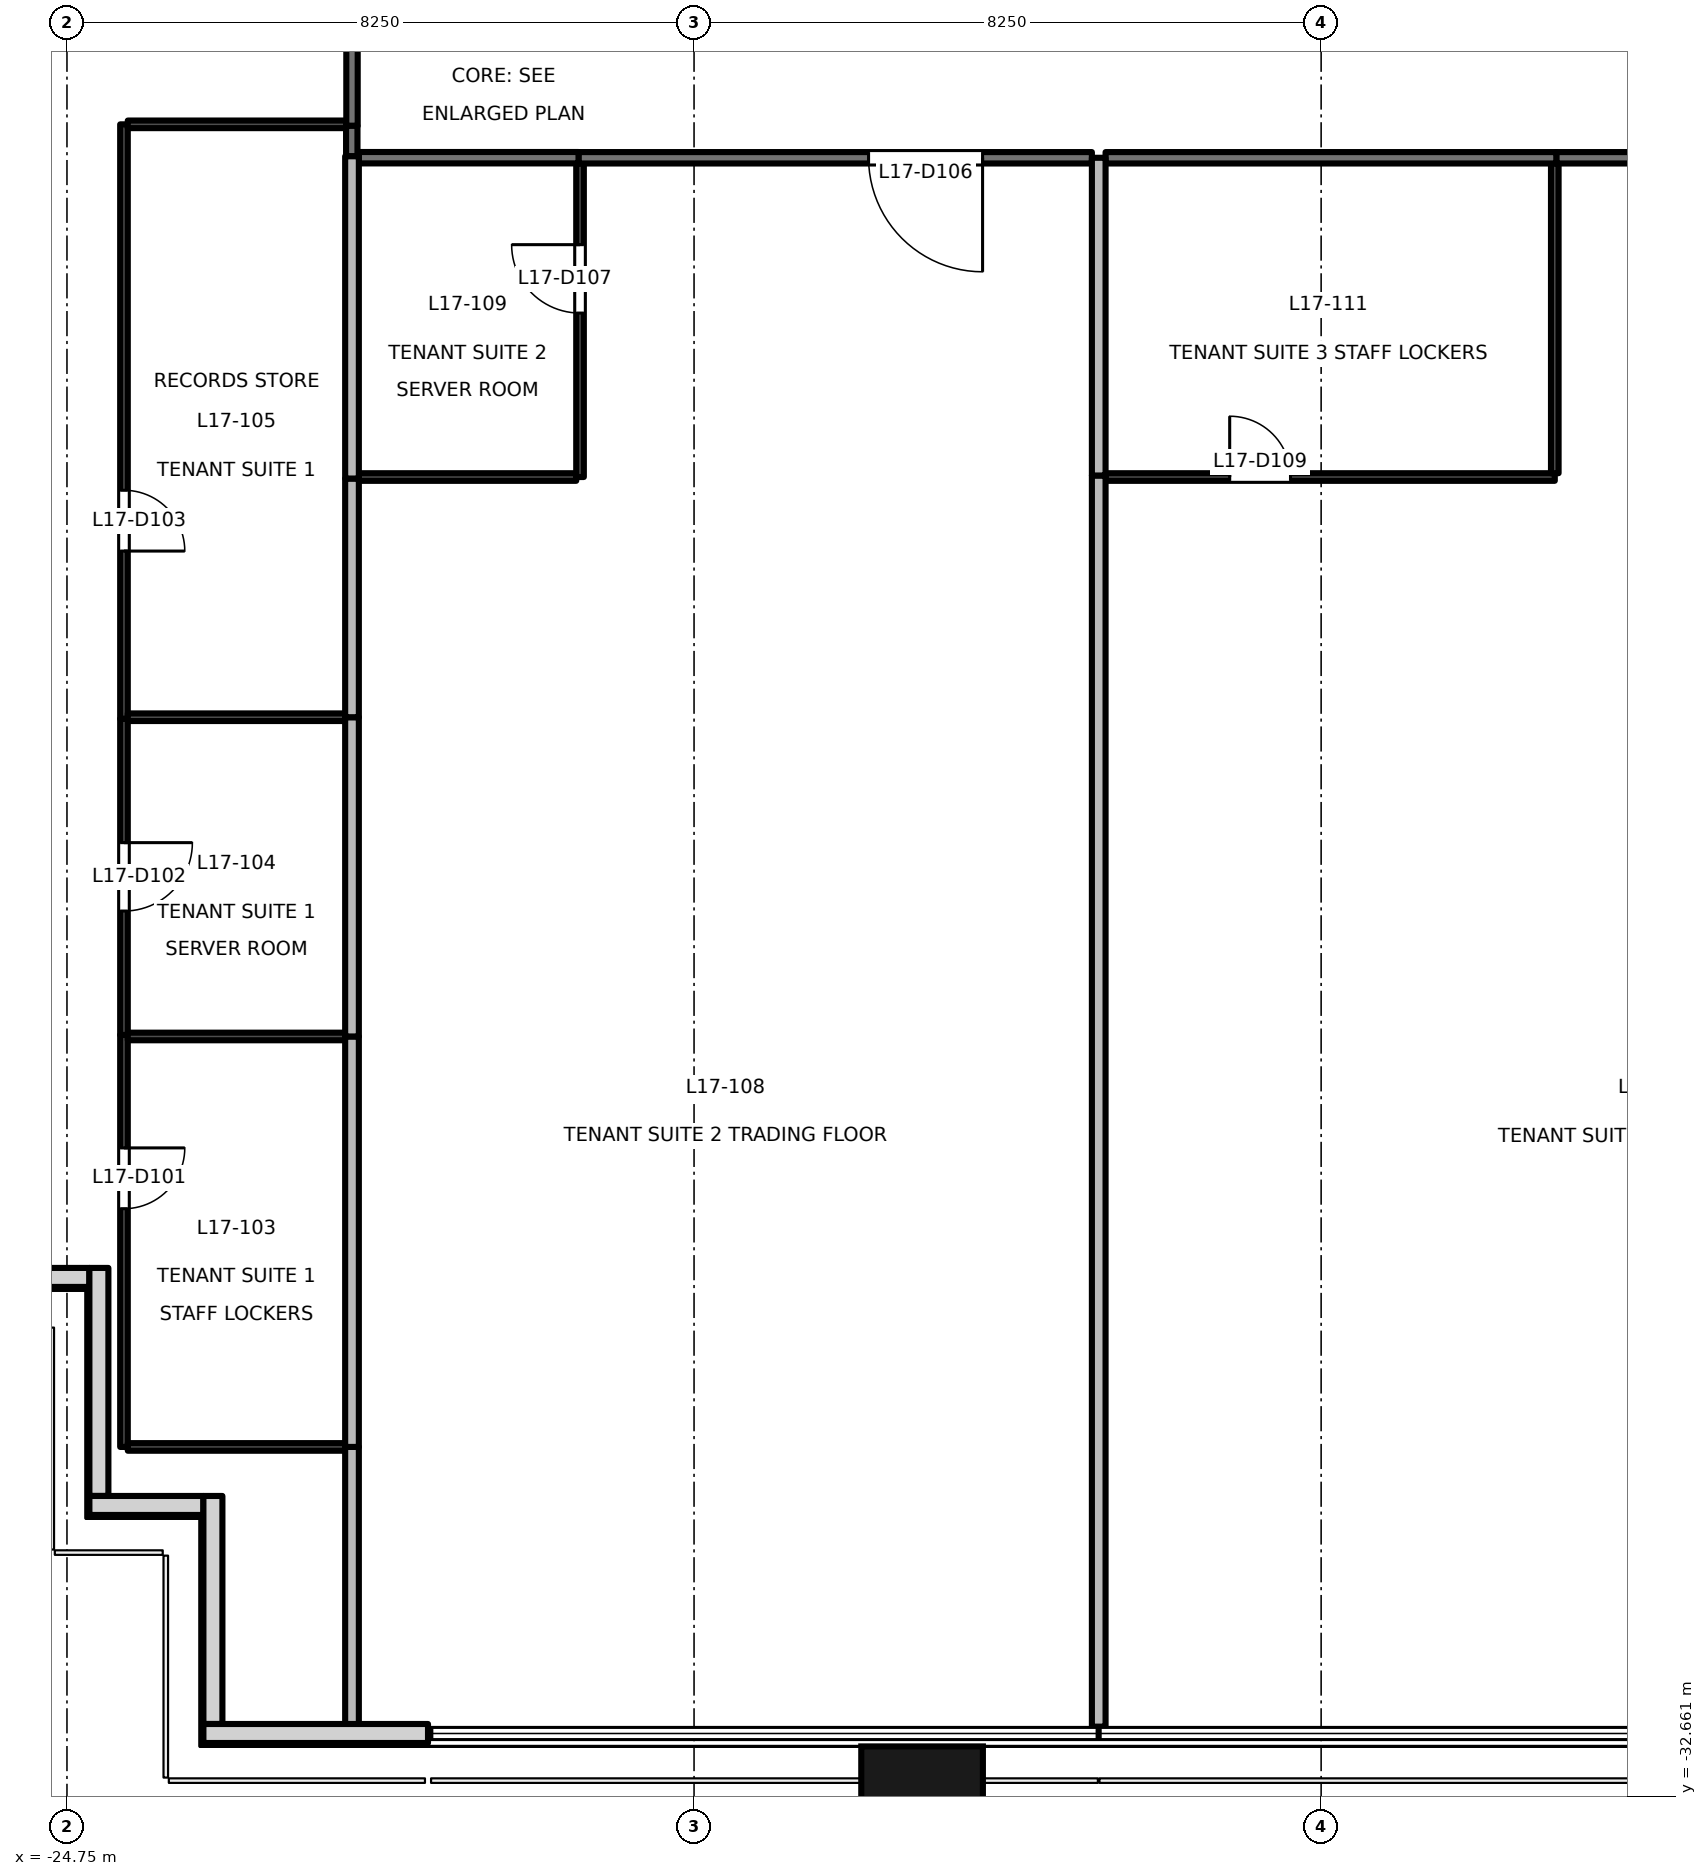
"""IFC4 building model, lengths in metres.
Left out: names, types, materials, properties, quantities, classifications, styles, units other than length and angle.
Written with IfcOpenShell. Run it as: python <this file> out.ifc"""

import sys

from ifc_helpers import new_model, si_unit, direction, frame, frame_2d, origin, origin_2d, place, context, subcontext, project, spatial, rectangle, extrude, element, fill, save


model = new_model("IFC4")
c1 = context("Model", 3, precision=1e-05, world=origin(), true_north=direction((0.0, 1.0)))
c2 = subcontext(c1, "Body", "Model", "MODEL_VIEW")
j1 = project(units=[si_unit("LENGTHUNIT", "METRE"), si_unit("PLANEANGLEUNIT", "RADIAN")], contexts=[c1])
p1 = place(None, origin())
s1 = spatial("IfcSite", under=j1, at=p1, CompositionType="ELEMENT")
p2 = place(p1, origin())
s2 = spatial("IfcBuilding", under=s1, at=p2, CompositionType="ELEMENT")
p3 = place(p2, frame((0.0, 0.0, 79.7)))
s3 = spatial("IfcBuildingStorey", under=s2, at=p3, CompositionType="ELEMENT", Elevation=79.7)
p4 = place(p3, frame((-13.5, -32.9, -0.2), z_axis=(0.0, 0.0, 1.0), x_axis=(1.0, 0.0, 0.0)))
e1 = element("IfcColumn", 1, at=p4, inside=s3, PredefinedType="COLUMN", context=c2, shape_type="SweptSolid", body=[
    extrude(rectangle(XDim=1.6, YDim=1.8, at=origin_2d()), origin(), (0.0, 0.0, 1.0), 4.0),
])
p5 = place(p3, frame((-25.91, -25.83, 0.0), z_axis=(0.0, 0.0, 1.0), x_axis=(1.0, 0.0, 0.0)))
e2 = element("IfcWall", 2, at=p5, inside=s3, PredefinedType="SOLIDWALL", context=c2, shape_type="SweptSolid", body=[
    extrude(rectangle(XDim=1.455, YDim=0.25, at=frame_2d((0.728, 0.0))), origin(), (0.0, 0.0, 1.0), 3.8),
])
p6 = place(p3, frame((-24.33, -25.705, 0.0), z_axis=(0.0, 0.0, 1.0), x_axis=(0.0, -1.0, 0.0)))
e3 = element("IfcWall", 3, at=p6, inside=s3, PredefinedType="SOLIDWALL", context=c2, shape_type="SweptSolid", body=[
    extrude(rectangle(XDim=3.0, YDim=0.25, at=frame_2d((1.5, 0.0))), origin(), (0.0, 0.0, 1.0), 3.8),
])
p7 = place(p3, frame((-24.455, -28.83, 0.0), z_axis=(0.0, 0.0, 1.0), x_axis=(1.0, 0.0, 0.0)))
e4 = element("IfcWall", 4, at=p7, inside=s3, PredefinedType="SOLIDWALL", context=c2, shape_type="SweptSolid", body=[
    extrude(rectangle(XDim=1.5, YDim=0.25, at=frame_2d((0.75, 0.0))), origin(), (0.0, 0.0, 1.0), 3.8),
])
p8 = place(p3, frame((-22.83, -28.705, 0.0), z_axis=(0.0, 0.0, 1.0), x_axis=(0.0, -1.0, 0.0)))
e5 = element("IfcWall", 5, at=p8, inside=s3, PredefinedType="SOLIDWALL", context=c2, shape_type="SweptSolid", body=[
    extrude(rectangle(XDim=3.0, YDim=0.25, at=frame_2d((1.5, 0.0))), origin(), (0.0, 0.0, 1.0), 3.8),
])
p9 = place(p3, frame((-22.955, -31.83, 0.0), z_axis=(0.0, 0.0, 1.0), x_axis=(1.0, 0.0, 0.0)))
e6 = element("IfcWall", 6, at=p9, inside=s3, PredefinedType="SOLIDWALL", context=c2, shape_type="SweptSolid", body=[
    extrude(rectangle(XDim=2.955, YDim=0.25, at=frame_2d((1.478, 0.0))), origin(), (0.0, 0.0, 1.0), 3.8),
])
p10 = place(p3, frame((-21.0, -10.68, 0.0), z_axis=(0.0, 0.0, 1.0), x_axis=(0.0, 1.0, 0.0)))
e7 = element("IfcWall", 7, at=p10, inside=s3, PredefinedType="PARTITIONING", context=c2, shape_type="SweptSolid", body=[
    extrude(rectangle(XDim=6.0, YDim=0.15, at=frame_2d((3.0, 0.0))), origin(), (0.0, 0.0, 1.0), 3.8),
])
p11 = place(p10, frame((3.7, 0.0, 0.0)))
e8 = element("IfcOpeningElement", 8, at=p11, cuts=e7, PredefinedType="OPENING", context=c2, shape_type="SweptSolid", body=[
    extrude(rectangle(XDim=0.9, YDim=2.1, at=frame_2d((0.45, 1.05))), frame((0.0, 0.085, 0.0), z_axis=(0.0, -1.0, 0.0), x_axis=(1.0, 0.0, 0.0)), (0.0, 0.0, 1.0), 0.171),
])
p12 = place(p3, frame((-21.003, -11.08, 0.0), z_axis=(0.0, 0.0, 1.0), x_axis=(0.0, 1.0, 0.0)))
e9 = element("IfcWall", 9, at=p12, inside=s3, PredefinedType="PARTITIONING", context=c2, shape_type="SweptSolid", body=[
    extrude(rectangle(XDim=0.4, YDim=0.15, at=frame_2d((0.2, 0.0))), origin(), (0.0, 0.0, 1.0), 3.8),
])
p13 = place(p3, frame((-11.266, -11.1, 0.0), z_axis=(0.0, 0.0, 1.0), x_axis=(-1.0, 0.0, 0.0)))
e10 = element("IfcWall", 10, at=p13, inside=s3, PredefinedType="PARTITIONING", context=c2, shape_type="SweptSolid", body=[
    extrude(rectangle(XDim=6.754, YDim=0.15, at=frame_2d((3.377, 0.0))), origin(), (0.0, 0.0, 1.0), 2.8),
])
p14 = place(p13, frame((1.438, 0.0, 0.0)))
e11 = element("IfcOpeningElement", 11, at=p14, cuts=e10, PredefinedType="OPENING", context=c2, shape_type="SweptSolid", body=[
    extrude(rectangle(XDim=1.5, YDim=2.1, at=frame_2d((0.75, 1.05))), frame((0.0, 0.085, 0.0), z_axis=(0.0, -1.0, 0.0), x_axis=(1.0, 0.0, 0.0)), (0.0, 0.0, 1.0), 0.171),
])
p15 = place(p3, frame((-18.02, -11.099, 0.0), z_axis=(0.0, 0.0, 1.0), x_axis=(-1.0, 0.0, 0.0)))
e12 = element("IfcWall", 12, at=p15, inside=s3, PredefinedType="PARTITIONING", context=c2, shape_type="SweptSolid", body=[
    extrude(rectangle(XDim=2.89, YDim=0.15, at=frame_2d((1.445, 0.0))), origin(), (0.0, 0.0, 1.0), 3.8),
])
p16 = place(p3, frame((-0.656, -11.1, 0.0), z_axis=(0.0, 0.0, 1.0), x_axis=(-1.0, 0.0, 0.0)))
e13 = element("IfcWall", 13, at=p16, inside=s3, PredefinedType="PARTITIONING", context=c2, shape_type="SweptSolid", body=[
    extrude(rectangle(XDim=4.5, YDim=0.15, at=frame_2d((2.25, 0.0))), origin(), (0.0, 0.0, 1.0), 2.8),
])
p17 = place(p16, frame((1.35, 0.0, 0.0)))
e14 = element("IfcOpeningElement", 14, at=p17, cuts=e13, PredefinedType="OPENING", context=c2, shape_type="SweptSolid", body=[
    extrude(rectangle(XDim=1.8, YDim=2.1, at=frame_2d((0.9, 1.05))), frame((0.0, 0.085, 0.0), z_axis=(0.0, -1.0, 0.0), x_axis=(1.0, 0.0, 0.0)), (0.0, 0.0, 1.0), 0.171),
])
p18 = place(p3, frame((-5.156, -11.1, 0.0), z_axis=(0.0, 0.0, 1.0), x_axis=(-1.0, 0.0, 0.0)))
e15 = element("IfcWall", 15, at=p18, inside=s3, PredefinedType="PARTITIONING", context=c2, shape_type="SweptSolid", body=[
    extrude(rectangle(XDim=5.93, YDim=0.15, at=frame_2d((2.965, 0.0))), origin(), (0.0, 0.0, 1.0), 2.8),
])
p19 = place(p3, frame((-24.0, -22.64, 0.0), z_axis=(0.0, 0.0, 1.0), x_axis=(0.0, -1.0, 0.0)))
e16 = element("IfcWall", 16, at=p19, inside=s3, PredefinedType="PARTITIONING", context=c2, shape_type="SweptSolid", body=[
    extrude(rectangle(XDim=5.42, YDim=0.1, at=frame_2d((2.71, 0.0))), origin(), (0.0, 0.0, 1.0), 3.8),
])
p20 = place(p19, frame((1.486, 0.0, 0.0)))
e17 = element("IfcOpeningElement", 17, at=p20, cuts=e16, PredefinedType="OPENING", context=c2, shape_type="SweptSolid", body=[
    extrude(rectangle(XDim=0.8, YDim=2.1, at=frame_2d((0.4, 1.05))), frame((0.0, 0.061, 0.0), z_axis=(0.0, -1.0, 0.0), x_axis=(1.0, 0.0, 0.0)), (0.0, 0.0, 1.0), 0.121),
])
p21 = place(p3, frame((-23.95, -28.06, 0.0), z_axis=(0.0, 0.0, 1.0), x_axis=(1.0, 0.0, 0.0)))
e18 = element("IfcWall", 18, at=p21, inside=s3, PredefinedType="PARTITIONING", context=c2, shape_type="SweptSolid", body=[
    extrude(rectangle(XDim=2.86, YDim=0.1, at=frame_2d((1.43, 0.0))), origin(), (0.0, 0.0, 1.0), 3.8),
])
p22 = place(p3, frame((-24.0, -18.48, 0.0), z_axis=(0.0, 0.0, 1.0), x_axis=(0.0, -1.0, 0.0)))
e19 = element("IfcWall", 19, at=p22, inside=s3, PredefinedType="PARTITIONING", context=c2, shape_type="SweptSolid", body=[
    extrude(rectangle(XDim=4.16, YDim=0.1, at=frame_2d((2.08, 0.0))), origin(), (0.0, 0.0, 1.0), 3.8),
])
p23 = place(p22, frame((1.63, 0.0, 0.0)))
e20 = element("IfcOpeningElement", 20, at=p23, cuts=e19, PredefinedType="OPENING", context=c2, shape_type="SweptSolid", body=[
    extrude(rectangle(XDim=0.9, YDim=2.1, at=frame_2d((0.45, 1.05))), frame((0.0, 0.061, 0.0), z_axis=(0.0, -1.0, 0.0), x_axis=(1.0, 0.0, 0.0)), (0.0, 0.0, 1.0), 0.121),
])
p24 = place(p3, frame((-24.0, -10.66, 0.0), z_axis=(0.0, 0.0, 1.0), x_axis=(0.0, -1.0, 0.0)))
e21 = element("IfcWall", 21, at=p24, inside=s3, PredefinedType="PARTITIONING", context=c2, shape_type="SweptSolid", body=[
    extrude(rectangle(XDim=7.82, YDim=0.1, at=frame_2d((3.91, 0.0))), origin(), (0.0, 0.0, 1.0), 3.8),
])
p25 = place(p24, frame((4.814, 0.0, 0.0)))
e22 = element("IfcOpeningElement", 22, at=p25, cuts=e21, PredefinedType="OPENING", context=c2, shape_type="SweptSolid", body=[
    extrude(rectangle(XDim=0.8, YDim=2.1, at=frame_2d((0.4, 1.05))), frame((0.0, 0.061, 0.0), z_axis=(0.0, -1.0, 0.0), x_axis=(1.0, 0.0, 0.0)), (0.0, 0.0, 1.0), 0.121),
])
p26 = place(p3, frame((-21.075, -10.66, 0.0), z_axis=(0.0, 0.0, 1.0), x_axis=(-1.0, 0.0, 0.0)))
e23 = element("IfcWall", 23, at=p26, inside=s3, PredefinedType="PARTITIONING", context=c2, shape_type="SweptSolid", body=[
    extrude(rectangle(XDim=2.875, YDim=0.1, at=frame_2d((1.438, 0.0))), origin(), (0.0, 0.0, 1.0), 3.8),
])
p27 = place(p3, frame((-21.0, -28.06, 0.0), z_axis=(0.0, 0.0, 1.0), x_axis=(0.0, -1.0, 0.0)))
e24 = element("IfcWall", 24, at=p27, inside=s3, PredefinedType="PARTITIONING", context=c2, shape_type="SweptSolid", body=[
    extrude(rectangle(XDim=3.68, YDim=0.18, at=frame_2d((1.84, 0.0))), origin(), (0.0, 0.0, 1.0), 3.8),
])
p28 = place(p3, frame((-23.95, -22.66, 0.0), z_axis=(0.0, 0.0, 1.0), x_axis=(1.0, 0.0, 0.0)))
e25 = element("IfcWall", 25, at=p28, inside=s3, PredefinedType="PARTITIONING", context=c2, shape_type="SweptSolid", body=[
    extrude(rectangle(XDim=2.86, YDim=0.1, at=frame_2d((1.43, 0.0))), origin(), (0.0, 0.0, 1.0), 3.8),
])
p29 = place(p3, frame((-21.0, -22.66, 0.0), z_axis=(0.0, 0.0, 1.0), x_axis=(0.0, -1.0, 0.0)))
e26 = element("IfcWall", 26, at=p29, inside=s3, PredefinedType="PARTITIONING", context=c2, shape_type="SweptSolid", body=[
    extrude(rectangle(XDim=5.4, YDim=0.18, at=frame_2d((2.7, 0.0))), origin(), (0.0, 0.0, 1.0), 3.8),
])
p30 = place(p3, frame((-23.95, -18.46, 0.0), z_axis=(0.0, 0.0, 1.0), x_axis=(1.0, 0.0, 0.0)))
e27 = element("IfcWall", 27, at=p30, inside=s3, PredefinedType="PARTITIONING", context=c2, shape_type="SweptSolid", body=[
    extrude(rectangle(XDim=2.86, YDim=0.1, at=frame_2d((1.43, 0.0))), origin(), (0.0, 0.0, 1.0), 3.8),
])
p31 = place(p3, frame((-21.0, -18.46, 0.0), z_axis=(0.0, 0.0, 1.0), x_axis=(0.0, -1.0, 0.0)))
e28 = element("IfcWall", 28, at=p31, inside=s3, PredefinedType="PARTITIONING", context=c2, shape_type="SweptSolid", body=[
    extrude(rectangle(XDim=4.2, YDim=0.18, at=frame_2d((2.1, 0.0))), origin(), (0.0, 0.0, 1.0), 3.8),
])
p32 = place(p3, frame((-21.0, -15.32, 0.0), z_axis=(0.0, 0.0, 1.0), x_axis=(0.0, -1.0, 0.0)))
e29 = element("IfcWall", 29, at=p32, inside=s3, PredefinedType="PARTITIONING", context=c2, shape_type="SweptSolid", body=[
    extrude(rectangle(XDim=3.14, YDim=0.18, at=frame_2d((1.57, 0.0))), origin(), (0.0, 0.0, 1.0), 3.8),
])
p33 = place(p3, frame((-21.0, -11.08, 0.0), z_axis=(0.0, 0.0, 1.0), x_axis=(0.0, -1.0, 0.0)))
e30 = element("IfcWall", 30, at=p33, inside=s3, PredefinedType="PARTITIONING", context=c2, shape_type="SweptSolid", body=[
    extrude(rectangle(XDim=4.24, YDim=0.18, at=frame_2d((2.12, 0.0))), origin(), (0.0, 0.0, 1.0), 3.8),
])
p34 = place(p3, frame((-20.91, -15.3, 0.0), z_axis=(0.0, 0.0, 1.0), x_axis=(1.0, 0.0, 0.0)))
e31 = element("IfcWall", 31, at=p34, inside=s3, PredefinedType="PARTITIONING", context=c2, shape_type="SweptSolid", body=[
    extrude(rectangle(XDim=2.86, YDim=0.1, at=frame_2d((1.43, 0.0))), origin(), (0.0, 0.0, 1.0), 3.8),
])
p35 = place(p3, frame((-18.0, -15.3, 0.0), z_axis=(0.0, 0.0, 1.0), x_axis=(0.0, 1.0, 0.0)))
e32 = element("IfcWall", 32, at=p35, inside=s3, PredefinedType="PARTITIONING", context=c2, shape_type="SweptSolid", body=[
    extrude(rectangle(XDim=4.125, YDim=0.1, at=frame_2d((2.062, 0.0))), origin(), (0.0, 0.0, 1.0), 3.8),
])
p36 = place(p35, frame((2.157, 0.0, 0.0)))
e33 = element("IfcOpeningElement", 33, at=p36, cuts=e32, PredefinedType="OPENING", context=c2, shape_type="SweptSolid", body=[
    extrude(rectangle(XDim=0.9, YDim=2.1, at=frame_2d((0.45, 1.05))), frame((0.0, 0.061, 0.0), z_axis=(0.0, -1.0, 0.0), x_axis=(1.0, 0.0, 0.0)), (0.0, 0.0, 1.0), 0.121),
])
p37 = place(p3, frame((-11.176, -15.28, 0.0), z_axis=(0.0, 0.0, 1.0), x_axis=(0.0, -1.0, 0.0)))
e34 = element("IfcWall", 34, at=p37, inside=s3, PredefinedType="PARTITIONING", context=c2, shape_type="SweptSolid", body=[
    extrude(rectangle(XDim=16.46, YDim=0.18, at=frame_2d((8.23, 0.0))), origin(), (0.0, 0.0, 1.0), 3.8),
])
p38 = place(p3, frame((-11.176, -11.1, 0.0), z_axis=(0.0, 0.0, 1.0), x_axis=(0.0, -1.0, 0.0)))
e35 = element("IfcWall", 35, at=p38, inside=s3, PredefinedType="PARTITIONING", context=c2, shape_type="SweptSolid", body=[
    extrude(rectangle(XDim=4.18, YDim=0.18, at=frame_2d((2.09, 0.0))), origin(), (0.0, 0.0, 1.0), 3.8),
])
p39 = place(p3, frame((-11.086, -15.3, 0.0), z_axis=(0.0, 0.0, 1.0), x_axis=(1.0, 0.0, 0.0)))
e36 = element("IfcWall", 36, at=p39, inside=s3, PredefinedType="PARTITIONING", context=c2, shape_type="SweptSolid", body=[
    extrude(rectangle(XDim=5.91, YDim=0.1, at=frame_2d((2.955, 0.0))), origin(), (0.0, 0.0, 1.0), 2.8),
])
p40 = place(p39, frame((1.633, 0.0, 0.0)))
e37 = element("IfcOpeningElement", 37, at=p40, cuts=e36, PredefinedType="OPENING", context=c2, shape_type="SweptSolid", body=[
    extrude(rectangle(XDim=0.8, YDim=2.1, at=frame_2d((0.4, 1.05))), frame((0.0, 0.061, 0.0), z_axis=(0.0, -1.0, 0.0), x_axis=(1.0, 0.0, 0.0)), (0.0, 0.0, 1.0), 0.121),
])
p41 = place(p3, frame((-5.176, -15.25, 0.0), z_axis=(0.0, 0.0, 1.0), x_axis=(0.0, 1.0, 0.0)))
e38 = element("IfcWall", 38, at=p41, inside=s3, PredefinedType="PARTITIONING", context=c2, shape_type="SweptSolid", body=[
    extrude(rectangle(XDim=4.075, YDim=0.1, at=frame_2d((2.038, 0.0))), origin(), (0.0, 0.0, 1.0), 3.8),
])
p42 = place(p20, origin())
e39 = element("IfcDoor", 39, at=p42, inside=s3, OperationType="SINGLE_SWING_LEFT", PredefinedType="DOOR", context=c2, shape_type="SweptSolid", body=[
    extrude(rectangle(XDim=0.8, YDim=2.1, at=frame_2d((0.4, 1.05))), frame((0.0, 0.025, 0.0), z_axis=(0.0, -1.0, 0.0), x_axis=(1.0, 0.0, 0.0)), (0.0, 0.0, 1.0), 0.05),
])
fill(e17, e39)
p43 = place(p23, origin())
e40 = element("IfcDoor", 40, at=p43, inside=s3, OperationType="SINGLE_SWING_LEFT", PredefinedType="DOOR", context=c2, shape_type="SweptSolid", body=[
    extrude(rectangle(XDim=0.9, YDim=2.1, at=frame_2d((0.45, 1.05))), frame((0.0, 0.025, 0.0), z_axis=(0.0, -1.0, 0.0), x_axis=(1.0, 0.0, 0.0)), (0.0, 0.0, 1.0), 0.05),
])
fill(e20, e40)
p44 = place(p25, origin())
e41 = element("IfcDoor", 41, at=p44, inside=s3, OperationType="SINGLE_SWING_RIGHT", PredefinedType="DOOR", context=c2, shape_type="SweptSolid", body=[
    extrude(rectangle(XDim=0.8, YDim=2.1, at=frame_2d((0.4, 1.05))), frame((0.0, 0.025, 0.0), z_axis=(0.0, -1.0, 0.0), x_axis=(1.0, 0.0, 0.0)), (0.0, 0.0, 1.0), 0.05),
])
fill(e22, e41)
p45 = place(p14, origin())
e42 = element("IfcDoor", 42, at=p45, inside=s3, OperationType="DOUBLE_DOOR_SINGLE_SWING", PredefinedType="DOOR", context=c2, shape_type="SweptSolid", body=[
    extrude(rectangle(XDim=1.5, YDim=2.1, at=frame_2d((0.75, 1.05))), frame((0.0, 0.025, 0.0), z_axis=(0.0, -1.0, 0.0), x_axis=(1.0, 0.0, 0.0)), (0.0, 0.0, 1.0), 0.05),
])
fill(e11, e42)
p46 = place(p36, origin())
e43 = element("IfcDoor", 43, at=p46, inside=s3, OperationType="SINGLE_SWING_RIGHT", PredefinedType="DOOR", context=c2, shape_type="SweptSolid", body=[
    extrude(rectangle(XDim=0.9, YDim=2.1, at=frame_2d((0.45, 1.05))), frame((0.0, 0.025, 0.0), z_axis=(0.0, -1.0, 0.0), x_axis=(1.0, 0.0, 0.0)), (0.0, 0.0, 1.0), 0.05),
])
fill(e33, e43)
p47 = place(p40, origin())
e44 = element("IfcDoor", 44, at=p47, inside=s3, OperationType="SINGLE_SWING_LEFT", PredefinedType="DOOR", context=c2, shape_type="SweptSolid", body=[
    extrude(rectangle(XDim=0.8, YDim=2.1, at=frame_2d((0.4, 1.05))), frame((0.0, 0.025, 0.0), z_axis=(0.0, -1.0, 0.0), x_axis=(1.0, 0.0, 0.0)), (0.0, 0.0, 1.0), 0.05),
])
fill(e37, e44)
save(model, sys.argv[1])
